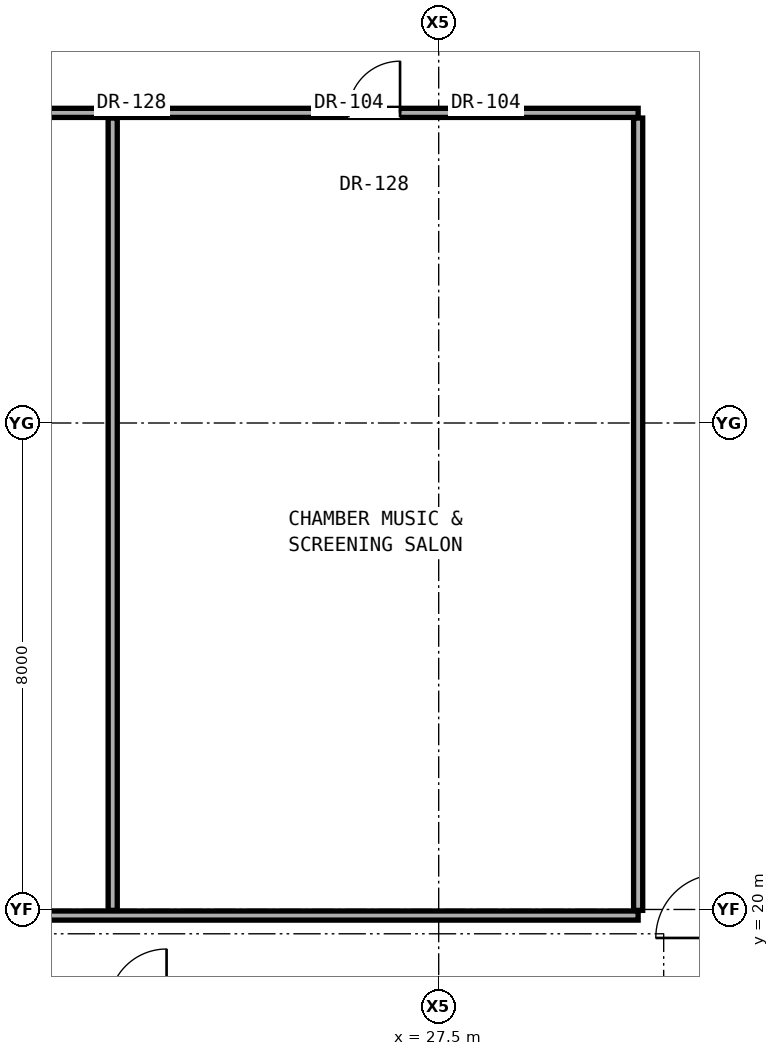
"""IFC4 building model, lengths in metres.
Left out: names, types, materials, properties, quantities, classifications, styles, units other than length and angle.
Written with IfcOpenShell. Run it as: python <this file> out.ifc"""

import sys

from ifc_helpers import new_model, si_unit, direction, frame, frame_2d, origin, place, context, subcontext, project, spatial, rectangle, extrude, element, fill, save


model = new_model("IFC4")
c1 = context("Model", 3, precision=1e-05, world=origin(), true_north=direction((0.0, 1.0)))
c2 = subcontext(c1, "Body", "Model", "MODEL_VIEW")
j1 = project(units=[si_unit("LENGTHUNIT", "METRE"), si_unit("PLANEANGLEUNIT", "RADIAN")], contexts=[c1])
p1 = place(None, origin())
s1 = spatial("IfcSite", under=j1, at=p1, CompositionType="ELEMENT")
p2 = place(p1, origin())
s2 = spatial("IfcBuilding", under=s1, at=p2, CompositionType="ELEMENT")
p3 = place(p2, frame((0.0, 0.0, 196.65)))
s3 = spatial("IfcBuildingStorey", under=s2, at=p3, CompositionType="ELEMENT", Elevation=196.65)
p4 = place(p3, frame((10.22, 19.9, 0.0), z_axis=(0.0, 0.0, 1.0), x_axis=(1.0, 0.0, 0.0)))
e1 = element("IfcWall", 1, at=p4, inside=s3, PredefinedType="PARTITIONING", context=c2, shape_type="SweptSolid", body=[
    extrude(rectangle(XDim=20.56, YDim=0.15, at=frame_2d((10.28, 0.0))), origin(), (0.0, 0.0, 1.0), 2.186),
])
p5 = place(p4, frame((1.36, 0.0, 0.0)))
e2 = element("IfcOpeningElement", 2, at=p5, cuts=e1, PredefinedType="OPENING", context=c2, shape_type="SweptSolid", body=[
    extrude(rectangle(XDim=0.9, YDim=2.1, at=frame_2d((0.45, 1.05))), frame((0.0, 0.085, 0.0), z_axis=(0.0, -1.0, 0.0), x_axis=(1.0, 0.0, 0.0)), (0.0, 0.0, 1.0), 0.17),
])
p6 = place(p4, frame((3.58, 0.0, 0.0)))
e3 = element("IfcOpeningElement", 3, at=p6, cuts=e1, PredefinedType="OPENING", context=c2, shape_type="SweptSolid", body=[
    extrude(rectangle(XDim=0.95, YDim=2.15, at=frame_2d((0.475, 1.075))), frame((0.0, 0.085, 0.0), z_axis=(0.0, -1.0, 0.0), x_axis=(1.0, 0.0, 0.0)), (0.0, 0.0, 1.0), 0.17),
])
p7 = place(p4, frame((8.1, 0.0, 0.0)))
e4 = element("IfcOpeningElement", 4, at=p7, cuts=e1, PredefinedType="OPENING", context=c2, shape_type="SweptSolid", body=[
    extrude(rectangle(XDim=0.85, YDim=2.01, at=frame_2d((0.425, 1.005))), frame((0.0, 0.085, 0.0), z_axis=(0.0, -1.0, 0.0), x_axis=(1.0, 0.0, 0.0)), (0.0, 0.0, 1.0), 0.17),
])
p8 = place(p3, frame((10.22, 33.1, 0.0), z_axis=(0.0, 0.0, 1.0), x_axis=(1.0, 0.0, 0.0)))
e5 = element("IfcWall", 5, at=p8, inside=s3, PredefinedType="PARTITIONING", context=c2, shape_type="SweptSolid", body=[
    extrude(rectangle(XDim=20.56, YDim=0.15, at=frame_2d((10.28, 0.0))), origin(), (0.0, 0.0, 1.0), 2.186),
])
p9 = place(p8, frame((15.794, 0.0, 0.0)))
e6 = element("IfcOpeningElement", 6, at=p9, cuts=e5, PredefinedType="OPENING", context=c2, shape_type="SweptSolid", body=[
    extrude(rectangle(XDim=0.85, YDim=2.01, at=frame_2d((0.425, 1.005))), frame((0.0, 0.085, 0.0), z_axis=(0.0, -1.0, 0.0), x_axis=(1.0, 0.0, 0.0)), (0.0, 0.0, 1.0), 0.17),
])
p10 = place(p3, frame((22.139, 19.985, 0.0), z_axis=(0.0, 0.0, 1.0), x_axis=(0.0, 1.0, 0.0)))
e7 = element("IfcWall", 7, at=p10, inside=s3, PredefinedType="PARTITIONING", context=c2, shape_type="SweptSolid", body=[
    extrude(rectangle(XDim=13.03, YDim=0.15, at=frame_2d((6.515, 0.0))), origin(), (0.0, 0.0, 1.0), 2.186),
])
p11 = place(p3, frame((30.78, 19.985, 0.0), z_axis=(0.0, 0.0, 1.0), x_axis=(0.0, 1.0, 0.0)))
e8 = element("IfcWall", 8, at=p11, inside=s3, PredefinedType="PARTITIONING", context=c2, shape_type="SweptSolid", body=[
    extrude(rectangle(XDim=13.03, YDim=0.15, at=frame_2d((6.515, 0.0))), origin(), (0.0, 0.0, 1.0), 2.346),
])
p12 = place(p9, origin())
e9 = element("IfcDoor", 9, at=p12, inside=s3, OperationType="SINGLE_SWING_RIGHT", PredefinedType="DOOR", context=c2, shape_type="SweptSolid", body=[
    extrude(rectangle(XDim=0.85, YDim=2.01, at=frame_2d((0.425, 1.005))), frame((0.0, 0.025, 0.0), z_axis=(0.0, -1.0, 0.0), x_axis=(1.0, 0.0, 0.0)), (0.0, 0.0, 1.0), 0.05),
])
fill(e6, e9)
save(model, sys.argv[1])
